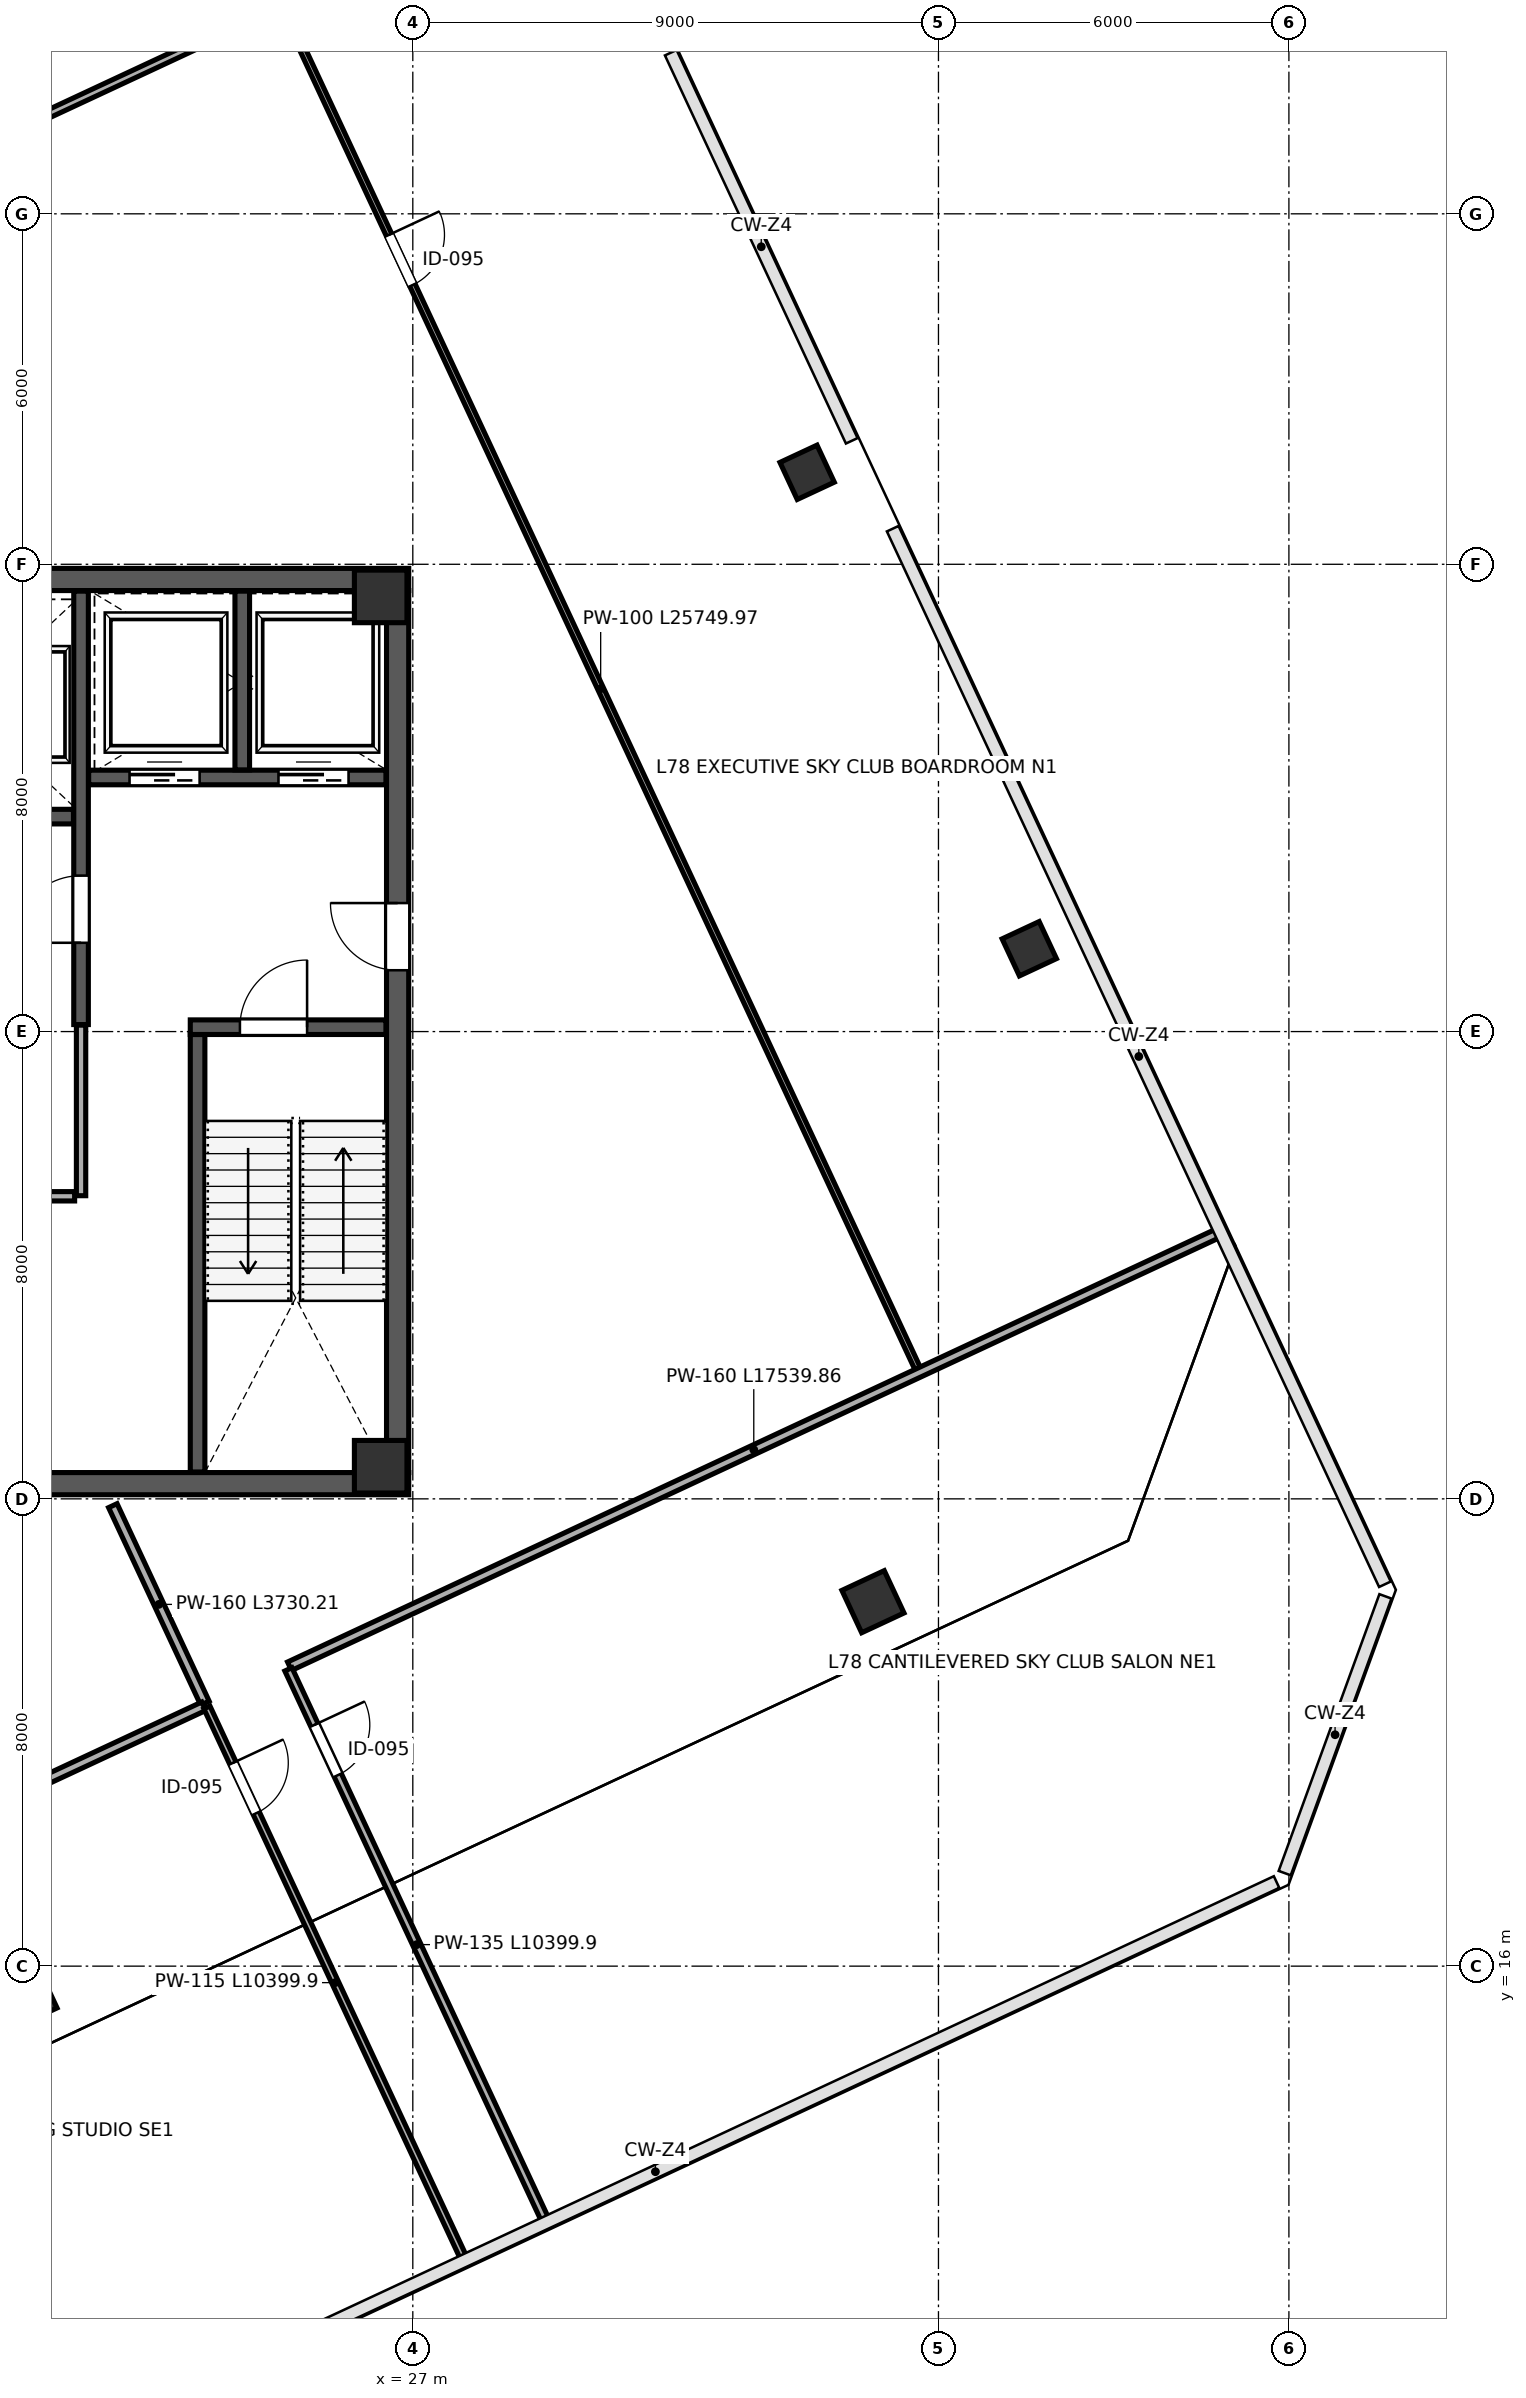
"""IFC4 building model, lengths in metres.
Left out: names, types, materials, properties, quantities, classifications, styles, units other than length and angle.
Written with IfcOpenShell. Run it as: python <this file> out.ifc"""

import sys

from ifc_helpers import new_model, si_unit, direction, frame, frame_2d, origin, origin_2d, place, context, subcontext, project, spatial, rectangle, extrude, clip, halfspace, source, transform, mapped, element, fill, save


model = new_model("IFC4")
c1 = context("Model", 3, precision=1e-05, world=origin(), true_north=direction((0.0, 1.0)))
c2 = subcontext(c1, "Body", "Model", "MODEL_VIEW")
j1 = project(units=[si_unit("LENGTHUNIT", "METRE"), si_unit("PLANEANGLEUNIT", "RADIAN")], contexts=[c1])
p1 = place(None, origin())
s1 = spatial("IfcSite", under=j1, at=p1, CompositionType="ELEMENT")
p2 = place(p1, origin())
s2 = spatial("IfcBuilding", under=s1, at=p2, CompositionType="ELEMENT")
p3 = place(p2, frame((0.0, 0.0, 345.0)))
s3 = spatial("IfcBuildingStorey", under=s2, at=p3, CompositionType="ELEMENT", Elevation=345.0)
m1 = source(origin(), c2, "Body", "SweptSolid", [
    extrude(rectangle(XDim=0.9, YDim=0.9, at=origin_2d()), origin(), (0.0, 0.0, 1.0), 4.198),
])
for number, where, z_axis, x_axis in (
    (1, (26.45, 24.55, 0.001), (0.0, 0.0, 1.0), (1.0, 0.0, 0.0)),
    (2, (26.45, 39.45, 0.001), (0.0, 0.0, 1.0), (1.0, 0.0, 0.0)),
):
    element("IfcColumn", number, at=place(p3, frame(where, z_axis=z_axis, x_axis=x_axis)), inside=s3, PredefinedType="COLUMN", context=c2, shape_type="MappedRepresentation", body=[
        mapped(m1, transform((0.0, 0.0, 0.0), scale=1.0)),
    ])
p4 = place(p3, frame((33.751, 41.575, 0.0), z_axis=(0.095432367806, -0.127740499541, 0.987205666491), x_axis=(-0.874055408456, 0.463835346238, 0.144512679474)))
e3 = element("IfcColumn", 3, at=p4, inside=s3, PredefinedType="COLUMN", context=c2, shape_type="Clipping", body=[
    clip(clip(extrude(rectangle(XDim=0.7, YDim=0.7, at=origin_2d()), origin(), (0.0, 0.0, 1.0), 4.254), halfspace(frame((0.0, 0.0, 0.076), z_axis=(0.0, 0.0, -1.0), x_axis=(1.0, 0.0, 0.0)), False)), halfspace(frame((0.0, 0.0, 4.178), z_axis=(0.0, 0.0, 1.0), x_axis=(1.0, 0.0, 0.0)), False)),
])
p5 = place(p3, frame((37.555, 33.418, 0.0), z_axis=(0.010950287477, -0.164770294282, 0.98627118042), x_axis=(-0.480961717614, 0.863873317213, 0.14966201254)))
e4 = element("IfcColumn", 4, at=p5, inside=s3, PredefinedType="COLUMN", context=c2, shape_type="Clipping", body=[
    clip(clip(extrude(rectangle(XDim=0.7, YDim=0.7, at=origin_2d()), origin(), (0.0, 0.0, 1.0), 4.258), halfspace(frame((0.0, 0.0, 0.079), z_axis=(0.0, 0.0, -1.0), x_axis=(1.0, 0.0, 0.0)), False)), halfspace(frame((0.0, 0.0, 4.18), z_axis=(0.0, 0.0, 1.0), x_axis=(1.0, 0.0, 0.0)), False)),
])
for number, where, z_axis, x_axis in (
    (5, (20.377, 15.478, 0.0), (-0.169, 0.015, 0.986), (0.927, 0.341, 0.154)),
    (6, (34.878, 22.24, 0.0), (-0.103, -0.135, 0.986), (0.206, 0.966, 0.154)),
):
    element("IfcColumn", number, at=place(p3, frame(where, z_axis=z_axis, x_axis=x_axis)), inside=s3, PredefinedType="COLUMN", context=c2, shape_type="Clipping", body=[
        clip(clip(extrude(rectangle(XDim=0.8, YDim=0.8, at=origin_2d()), origin(), (0.0, 0.0, 1.0), 4.262), halfspace(frame((0.0, 0.0, 0.092), z_axis=(0.0, 0.0, -1.0), x_axis=(1.0, 0.0, 0.0)), False)), halfspace(frame((0.0, 0.0, 4.169), z_axis=(0.0, 0.0, 1.0), x_axis=(1.0, 0.0, 0.0)), False)),
    ])
p6 = place(p3, frame((26.74, 24.45, 0.0), z_axis=(0.0, 0.0, 1.0), x_axis=(0.0, 1.0, 0.0)))
e7 = element("IfcWall", 7, at=p6, inside=s3, PredefinedType="SHEAR", context=c2, shape_type="SweptSolid", body=[
    extrude(rectangle(XDim=15.1, YDim=0.38, at=frame_2d((7.55, 0.0))), origin(), (0.0, 0.0, 1.0), 3.92),
])
p7 = place(p6, frame((8.6, 0.0, 0.0)))
e8 = element("IfcOpeningElement", 8, at=p7, cuts=e7, PredefinedType="OPENING", context=c2, shape_type="SweptSolid", body=[
    extrude(rectangle(XDim=1.15, YDim=2.2, at=frame_2d((0.575, 1.1))), frame((0.0, 0.2, 0.0), z_axis=(0.0, -1.0, 0.0), x_axis=(1.0, 0.0, 0.0)), (0.0, 0.0, 1.0), 0.4),
])
for number, where, z_axis, x_axis in (
    (9, (9.07, 24.26, 0.0), (0.0, 0.0, 1.0), (1.0, 0.0, 0.0)),
    (10, (9.07, 39.74, 0.0), (0.0, 0.0, 1.0), (1.0, 0.0, 0.0)),
):
    element("IfcWall", number, at=place(p3, frame(where, z_axis=z_axis, x_axis=x_axis)), inside=s3, PredefinedType="SHEAR", context=c2, shape_type="SweptSolid", body=[
        extrude(rectangle(XDim=17.86, YDim=0.38, at=frame_2d((8.93, 0.0))), origin(), (0.0, 0.0, 1.0), 3.92),
    ])
p8 = place(p3, frame((23.315, 24.46, 0.0), z_axis=(0.0, 0.0, 1.0), x_axis=(0.0, 1.0, 0.0)))
e11 = element("IfcWall", 11, at=p8, inside=s3, PredefinedType="SHEAR", context=c2, shape_type="SweptSolid", body=[
    extrude(rectangle(XDim=7.49, YDim=0.25, at=frame_2d((3.745, 0.0))), origin(), (0.0, 0.0, 1.0), 3.92),
])
p9 = place(p3, frame((23.19, 32.075, 0.0), z_axis=(0.0, 0.0, 1.0), x_axis=(1.0, 0.0, 0.0)))
e12 = element("IfcWall", 12, at=p9, inside=s3, PredefinedType="SHEAR", context=c2, shape_type="SweptSolid", body=[
    extrude(rectangle(XDim=3.35, YDim=0.25, at=frame_2d((1.675, 0.0))), origin(), (0.0, 0.0, 1.0), 3.92),
])
p10 = place(p9, frame((0.85, 0.0, 0.0)))
e13 = element("IfcOpeningElement", 13, at=p10, cuts=e12, PredefinedType="OPENING", context=c2, shape_type="SweptSolid", body=[
    extrude(rectangle(XDim=1.15, YDim=2.2, at=frame_2d((0.575, 1.1))), frame((0.0, 0.135, 0.0), z_axis=(0.0, -1.0, 0.0), x_axis=(1.0, 0.0, 0.0)), (0.0, 0.0, 1.0), 0.27),
])
p11 = place(p3, frame((21.32, 32.12, 0.0), z_axis=(0.0, 0.0, 1.0), x_axis=(0.0, 1.0, 0.0)))
e14 = element("IfcWall", 14, at=p11, inside=s3, PredefinedType="SHEAR", context=c2, shape_type="SweptSolid", body=[
    extrude(rectangle(XDim=7.42, YDim=0.25, at=frame_2d((3.71, 0.0))), origin(), (0.0, 0.0, 1.0), 3.92),
])
p12 = place(p11, frame((1.4, 0.0, 0.0)))
e15 = element("IfcOpeningElement", 15, at=p12, cuts=e14, PredefinedType="OPENING", context=c2, shape_type="SweptSolid", body=[
    extrude(rectangle(XDim=1.15, YDim=2.2, at=frame_2d((0.575, 1.1))), frame((0.0, 0.135, 0.0), z_axis=(0.0, -1.0, 0.0), x_axis=(1.0, 0.0, 0.0)), (0.0, 0.0, 1.0), 0.27),
])
p13 = place(p3, frame((21.45, 36.35, 0.0), z_axis=(0.0, 0.0, 1.0), x_axis=(1.0, 0.0, 0.0)))
e16 = element("IfcWall", 16, at=p13, inside=s3, PredefinedType="SHEAR", context=c2, shape_type="SweptSolid", body=[
    extrude(rectangle(XDim=5.09, YDim=0.25, at=frame_2d((2.545, 0.0))), origin(), (0.0, 0.0, 1.0), 3.92),
])
p14 = place(p13, frame((0.7, 0.0, 0.0)))
e17 = element("IfcOpeningElement", 17, at=p14, cuts=e16, PredefinedType="OPENING", context=c2, shape_type="SweptSolid", body=[
    extrude(rectangle(XDim=1.2, YDim=2.2, at=frame_2d((0.6, 1.1))), frame((0.0, 0.135, 0.0), z_axis=(0.0, -1.0, 0.0), x_axis=(1.0, 0.0, 0.0)), (0.0, 0.0, 1.0), 0.27),
])
p15 = place(p13, frame((3.25, 0.0, 0.0)))
e18 = element("IfcOpeningElement", 18, at=p15, cuts=e16, PredefinedType="OPENING", context=c2, shape_type="SweptSolid", body=[
    extrude(rectangle(XDim=1.2, YDim=2.2, at=frame_2d((0.6, 1.1))), frame((0.0, 0.135, 0.0), z_axis=(0.0, -1.0, 0.0), x_axis=(1.0, 0.0, 0.0)), (0.0, 0.0, 1.0), 0.27),
])
p16 = place(p3, frame((24.08, 36.48, 0.0), z_axis=(0.0, 0.0, 1.0), x_axis=(0.0, 1.0, 0.0)))
e19 = element("IfcWall", 19, at=p16, inside=s3, PredefinedType="SHEAR", context=c2, shape_type="SweptSolid", body=[
    extrude(rectangle(XDim=3.06, YDim=0.25, at=frame_2d((1.53, 0.0))), origin(), (0.0, 0.0, 1.0), 3.92),
])
p17 = place(p3, frame((17.32, 35.68, 0.0), z_axis=(0.0, 0.0, 1.0), x_axis=(1.0, 0.0, 0.0)))
e20 = element("IfcWall", 20, at=p17, inside=s3, PredefinedType="SHEAR", context=c2, shape_type="SweptSolid", body=[
    extrude(rectangle(XDim=3.87, YDim=0.25, at=frame_2d((1.935, 0.0))), origin(), (0.0, 0.0, 1.0), 3.92),
])
p18 = place(p17, frame((0.45, 0.0, 0.0)))
e21 = element("IfcOpeningElement", 21, at=p18, cuts=e20, PredefinedType="OPENING", context=c2, shape_type="SweptSolid", body=[
    extrude(rectangle(XDim=1.1, YDim=2.2, at=frame_2d((0.55, 1.1))), frame((0.0, 0.135, 0.0), z_axis=(0.0, -1.0, 0.0), x_axis=(1.0, 0.0, 0.0)), (0.0, 0.0, 1.0), 0.27),
])
p19 = place(p17, frame((2.35, 0.0, 0.0)))
e22 = element("IfcOpeningElement", 22, at=p19, cuts=e20, PredefinedType="OPENING", context=c2, shape_type="SweptSolid", body=[
    extrude(rectangle(XDim=1.1, YDim=2.2, at=frame_2d((0.55, 1.1))), frame((0.0, 0.135, 0.0), z_axis=(0.0, -1.0, 0.0), x_axis=(1.0, 0.0, 0.0)), (0.0, 0.0, 1.0), 0.27),
])
p20 = place(p3, frame((12.84, 29.18, 0.0), z_axis=(0.0, 0.0, 1.0), x_axis=(1.0, 0.0, 0.0)))
e23 = element("IfcWall", 23, at=p20, inside=s3, PredefinedType="PARTITIONING", context=c2, shape_type="SweptSolid", body=[
    extrude(rectangle(XDim=8.37, YDim=0.16, at=frame_2d((4.185, 0.0))), origin(), (0.0, 0.0, 1.0), 3.92),
])
p21 = place(p20, frame((2.6, 0.0, 0.0)))
e24 = element("IfcOpeningElement", 24, at=p21, cuts=e23, PredefinedType="OPENING", context=c2, shape_type="SweptSolid", body=[
    extrude(rectangle(XDim=0.9, YDim=2.15, at=frame_2d((0.45, 1.075))), frame((0.0, 0.09, 0.0), z_axis=(0.0, -1.0, 0.0), x_axis=(1.0, 0.0, 0.0)), (0.0, 0.0, 1.0), 0.18),
])
p22 = place(p3, frame((21.32, 29.19, 0.0), z_axis=(0.0, 0.0, 1.0), x_axis=(0.0, 1.0, 0.0)))
e25 = element("IfcWall", 25, at=p22, inside=s3, PredefinedType="PARTITIONING", context=c2, shape_type="SweptSolid", body=[
    extrude(rectangle(XDim=2.92, YDim=0.16, at=frame_2d((1.46, 0.0))), origin(), (0.0, 0.0, 1.0), 3.92),
])
p23 = place(p3, frame((21.864, 23.884, 0.0), z_axis=(0.0, 0.0, 1.0), x_axis=(0.42259522887, -0.906318527085, 0.0)))
e26 = element("IfcWall", 26, at=p23, inside=s3, PredefinedType="PARTITIONING", context=c2, shape_type="SweptSolid", body=[
    extrude(rectangle(XDim=3.73, YDim=0.16, at=frame_2d((1.865, 0.0))), origin(), (0.0, 0.0, 1.0), 3.92),
])
p24 = place(p3, frame((24.775, 49.537, 0.0), z_axis=(0.0, 0.0, 1.0), x_axis=(0.422615543458, -0.906309054588, 0.0)))
e27 = element("IfcWall", 27, at=p24, inside=s3, PredefinedType="PARTITIONING", context=c2, shape_type="SweptSolid", body=[
    extrude(rectangle(XDim=25.75, YDim=0.1, at=frame_2d((12.875, 0.0))), origin(), (0.0, 0.0, 1.0), 3.92),
])
p25 = place(p24, frame((4.3, 0.0, 0.0)))
e28 = element("IfcOpeningElement", 28, at=p25, cuts=e27, PredefinedType="OPENING", context=c2, shape_type="SweptSolid", body=[
    extrude(rectangle(XDim=0.95, YDim=2.15, at=frame_2d((0.475, 1.075))), frame((0.0, 0.06, 0.0), z_axis=(0.0, -1.0, 0.0), x_axis=(1.0, 0.0, 0.0)), (0.0, 0.0, 1.0), 0.12),
])
p26 = place(p3, frame((17.925, 46.387, 0.0), z_axis=(0.0, 0.0, 1.0), x_axis=(0.906304624979, 0.422625042729, 0.0)))
e29 = element("IfcWall", 29, at=p26, inside=s3, PredefinedType="PARTITIONING", context=c2, shape_type="SweptSolid", body=[
    extrude(rectangle(XDim=12.472, YDim=0.135, at=frame_2d((6.236, 0.0))), origin(), (0.0, 0.0, 1.0), 3.212),
])
p27 = place(p3, frame((24.89, 21.135, 0.0), z_axis=(0.0, 0.0, 1.0), x_axis=(0.906308982529, 0.42261569799, 0.0)))
e30 = element("IfcWall", 30, at=p27, inside=s3, PredefinedType="PARTITIONING", context=c2, shape_type="SweptSolid", body=[
    extrude(rectangle(XDim=17.54, YDim=0.16, at=frame_2d((8.77, 0.0))), origin(), (0.0, 0.0, 1.0), 3.92),
])
p28 = place(p3, frame((12.654, 15.429, 0.0), z_axis=(0.0, 0.0, 1.0), x_axis=(0.906316447934, 0.42259968789, 0.0)))
e31 = element("IfcWall", 31, at=p28, inside=s3, PredefinedType="PARTITIONING", context=c2, shape_type="SweptSolid", body=[
    extrude(rectangle(XDim=11.88, YDim=0.16, at=frame_2d((5.94, 0.0))), origin(), (0.0, 0.0, 1.0), 3.92),
])
p29 = place(p3, frame((24.87, 21.081, 0.0), z_axis=(0.0, 0.0, 1.0), x_axis=(0.422623279804, -0.906305447058, 0.0)))
e32 = element("IfcWall", 32, at=p29, inside=s3, PredefinedType="PARTITIONING", context=c2, shape_type="SweptSolid", body=[
    extrude(rectangle(XDim=10.4, YDim=0.135, at=frame_2d((5.2, 0.0))), origin(), (0.0, 0.0, 1.0), 3.92),
])
p30 = place(p29, frame((1.05, 0.0, 0.0)))
e33 = element("IfcOpeningElement", 33, at=p30, cuts=e32, PredefinedType="OPENING", context=c2, shape_type="SweptSolid", body=[
    extrude(rectangle(XDim=0.95, YDim=2.15, at=frame_2d((0.475, 1.075))), frame((0.0, 0.078, 0.0), z_axis=(0.0, -1.0, 0.0), x_axis=(1.0, 0.0, 0.0)), (0.0, 0.0, 1.0), 0.155),
])
p31 = place(p3, frame((23.475, 20.43, 0.0), z_axis=(0.0, 0.0, 1.0), x_axis=(0.422603997267, -0.906314438533, 0.0)))
e34 = element("IfcWall", 34, at=p31, inside=s3, PredefinedType="PARTITIONING", context=c2, shape_type="SweptSolid", body=[
    extrude(rectangle(XDim=10.4, YDim=0.115, at=frame_2d((5.2, 0.0))), origin(), (0.0, 0.0, 1.0), 3.92),
])
p32 = place(p31, frame((1.05, 0.0, 0.0)))
e35 = element("IfcOpeningElement", 35, at=p32, cuts=e34, PredefinedType="OPENING", context=c2, shape_type="SweptSolid", body=[
    extrude(rectangle(XDim=0.95, YDim=2.15, at=frame_2d((0.475, 1.075))), frame((0.0, 0.067, 0.0), z_axis=(0.0, -1.0, 0.0), x_axis=(1.0, 0.0, 0.0)), (0.0, 0.0, 1.0), 0.135),
])
m2 = source(origin(), c2, "Body", "SweptSolid", [
    extrude(rectangle(XDim=1.15, YDim=2.2, at=frame_2d((0.575, 1.1))), frame((0.0, 0.025, 0.0), z_axis=(0.0, -1.0, 0.0), x_axis=(1.0, 0.0, 0.0)), (0.0, 0.0, 1.0), 0.05),
])
p33 = place(p12, origin())
e36 = element("IfcDoor", 36, at=p33, inside=s3, OperationType="SINGLE_SWING_LEFT", PredefinedType="DOOR", context=c2, shape_type="MappedRepresentation", body=[
    mapped(m2, transform((0.0, 0.0, 0.0), scale=1.0)),
])
fill(e15, e36)
m3 = source(origin(), c2, "Body", "SweptSolid", [
    extrude(rectangle(XDim=1.15, YDim=2.2, at=frame_2d((0.575, 1.1))), frame((0.0, 0.025, 0.0), z_axis=(0.0, -1.0, 0.0), x_axis=(1.0, 0.0, 0.0)), (0.0, 0.0, 1.0), 0.05),
])
p34 = place(p10, origin())
e37 = element("IfcDoor", 37, at=p34, inside=s3, OperationType="SINGLE_SWING_RIGHT", PredefinedType="DOOR", context=c2, shape_type="MappedRepresentation", body=[
    mapped(m3, transform((0.0, 0.0, 0.0), scale=1.0)),
])
fill(e13, e37)
p35 = place(p7, origin())
e38 = element("IfcDoor", 38, at=p35, inside=s3, OperationType="SINGLE_SWING_RIGHT", PredefinedType="DOOR", context=c2, shape_type="MappedRepresentation", body=[
    mapped(m2, transform((0.0, 0.0, 0.0), scale=1.0)),
])
fill(e8, e38)
m4 = source(origin(), c2, "Body", "SweptSolid", [
    extrude(rectangle(XDim=1.2, YDim=2.2, at=frame_2d((0.6, 1.1))), frame((0.0, 0.025, 0.0), z_axis=(0.0, -1.0, 0.0), x_axis=(1.0, 0.0, 0.0)), (0.0, 0.0, 1.0), 0.05),
])
p36 = place(p14, origin())
e39 = element("IfcDoor", 39, at=p36, inside=s3, OperationType="SLIDING_TO_LEFT", PredefinedType="DOOR", context=c2, shape_type="MappedRepresentation", body=[
    mapped(m4, transform((0.0, 0.0, 0.0), scale=1.0)),
])
fill(e17, e39)
p37 = place(p15, origin())
e40 = element("IfcDoor", 40, at=p37, inside=s3, OperationType="SLIDING_TO_RIGHT", PredefinedType="DOOR", context=c2, shape_type="MappedRepresentation", body=[
    mapped(m4, transform((0.0, 0.0, 0.0), scale=1.0)),
])
fill(e18, e40)
m5 = source(origin(), c2, "Body", "SweptSolid", [
    extrude(rectangle(XDim=0.95, YDim=2.15, at=frame_2d((0.475, 1.075))), frame((0.0, 0.025, 0.0), z_axis=(0.0, -1.0, 0.0), x_axis=(1.0, 0.0, 0.0)), (0.0, 0.0, 1.0), 0.05),
])
p38 = place(p25, origin())
e41 = element("IfcDoor", 41, at=p38, inside=s3, OperationType="SINGLE_SWING_LEFT", PredefinedType="DOOR", context=c2, shape_type="MappedRepresentation", body=[
    mapped(m5, transform((0.0, 0.0, 0.0), scale=1.0)),
])
fill(e28, e41)
p39 = place(p30, origin())
e42 = element("IfcDoor", 42, at=p39, inside=s3, OperationType="SINGLE_SWING_LEFT", PredefinedType="DOOR", context=c2, shape_type="MappedRepresentation", body=[
    mapped(m5, transform((0.0, 0.0, 0.0), scale=1.0)),
])
fill(e33, e42)
p40 = place(p32, origin())
e43 = element("IfcDoor", 43, at=p40, inside=s3, OperationType="SINGLE_SWING_LEFT", PredefinedType="DOOR", context=c2, shape_type="MappedRepresentation", body=[
    mapped(m5, transform((0.0, 0.0, 0.0), scale=1.0)),
])
fill(e35, e43)
save(model, sys.argv[1])
